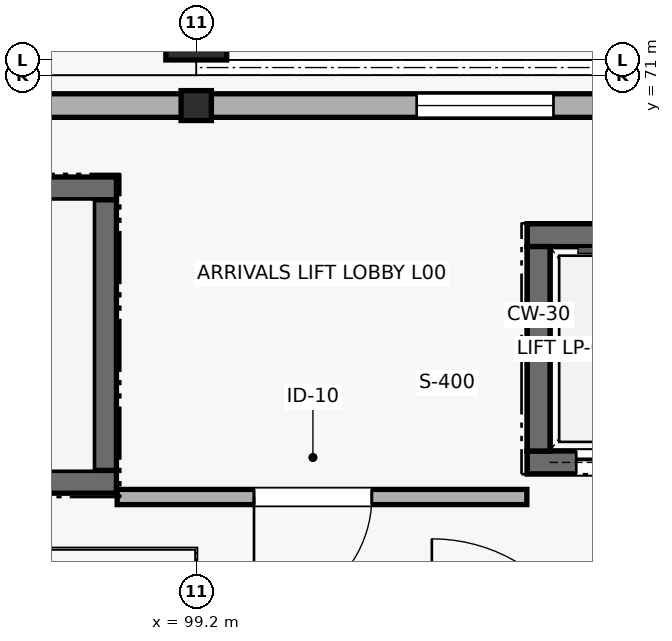
"""IFC4 building model, lengths in metres.
Left out: names, types, materials, properties, quantities, classifications, styles, units other than length and angle.
Written with IfcOpenShell. Run it as: python <this file> out.ifc"""

import sys

from ifc_helpers import new_model, si_unit, direction, frame, frame_2d, origin, origin_2d, place, context, subcontext, project, spatial, rectangle, i_section, extrude, element, fill, save


model = new_model("IFC4")
c1 = context("Model", 3, precision=1e-05, world=origin(), true_north=direction((0.0, 1.0)))
c2 = subcontext(c1, "Body", "Model", "MODEL_VIEW")
j1 = project(units=[si_unit("LENGTHUNIT", "METRE"), si_unit("PLANEANGLEUNIT", "RADIAN")], contexts=[c1])
p1 = place(None, origin())
s1 = spatial("IfcSite", under=j1, at=p1, CompositionType="ELEMENT")
p2 = place(p1, origin())
s2 = spatial("IfcBuilding", under=s1, at=p2, CompositionType="ELEMENT")
p3 = place(p2, origin())
s3 = spatial("IfcBuildingStorey", under=s2, at=p3, CompositionType="ELEMENT", Elevation=0.0)
p4 = place(p3, frame((99.2, 70.6, 0.0), z_axis=(0.0, 0.0, 1.0), x_axis=(1.0, 0.0, 0.0)))
e1 = element("IfcColumn", 1, at=p4, inside=s3, PredefinedType="COLUMN", context=c2, shape_type="SweptSolid", body=[
    extrude(i_section(OverallWidth=0.399, OverallDepth=0.394, WebThickness=0.023, FlangeThickness=0.037, FilletRadius=0.018, at=origin_2d()), origin(), (0.0, 0.0, 1.0), 5.4),
])
p5 = place(p3, frame((99.2, 71.6, 0.0), z_axis=(0.0, 0.0, 1.0), x_axis=(1.0, 0.0, 0.0)))
e2 = element("IfcColumn", 2, at=p5, inside=s3, PredefinedType="COLUMN", context=c2, shape_type="SweptSolid", body=[
    extrude(rectangle(XDim=0.8, YDim=0.8, at=origin_2d()), origin(), (0.0, 0.0, 1.0), 5.4),
])
p6 = place(p3, frame((99.191, 70.6, 0.0), z_axis=(0.0, 0.0, 1.0), x_axis=(-1.0, 0.0, 0.0)))
e3 = element("IfcWall", 3, at=p6, inside=s3, PredefinedType="SOLIDWALL", context=c2, shape_type="SweptSolid", body=[
    extrude(rectangle(XDim=10.581, YDim=0.31, at=frame_2d((5.291, 0.0))), origin(), (0.0, 0.0, 1.0), 4.402),
])
p7 = place(p6, frame((4.291, 0.0, 0.0)))
e4 = element("IfcOpeningElement", 4, at=p7, cuts=e3, PredefinedType="OPENING", context=c2, shape_type="SweptSolid", body=[
    extrude(rectangle(XDim=2.4, YDim=2.6, at=frame_2d((1.2, 1.3))), frame((0.0, 0.165, 0.0), z_axis=(0.0, -1.0, 0.0), x_axis=(1.0, 0.0, 0.0)), (0.0, 0.0, 1.0), 0.33),
])
p8 = place(p3, frame((110.191, 70.6, 0.0), z_axis=(0.0, 0.0, 1.0), x_axis=(-1.0, 0.0, 0.0)))
e5 = element("IfcWall", 5, at=p8, inside=s3, PredefinedType="SOLIDWALL", context=c2, shape_type="SweptSolid", body=[
    extrude(rectangle(XDim=10.981, YDim=0.31, at=frame_2d((5.491, 0.0))), origin(), (0.0, 0.0, 1.0), 4.402),
])
p9 = place(p8, frame((2.591, 0.0, 1.05)))
e6 = element("IfcOpeningElement", 6, at=p9, cuts=e5, PredefinedType="OPENING", context=c2, shape_type="SweptSolid", body=[
    extrude(rectangle(XDim=1.8, YDim=1.8, at=frame_2d((0.9, 0.9))), frame((0.0, 0.165, 0.0), z_axis=(0.0, -1.0, 0.0), x_axis=(1.0, 0.0, 0.0)), (0.0, 0.0, 1.0), 0.33),
])
p10 = place(p8, frame((6.291, 0.0, 1.05)))
e7 = element("IfcOpeningElement", 7, at=p10, cuts=e5, PredefinedType="OPENING", context=c2, shape_type="SweptSolid", body=[
    extrude(rectangle(XDim=1.8, YDim=1.8, at=frame_2d((0.9, 0.9))), frame((0.0, 0.165, 0.0), z_axis=(0.0, -1.0, 0.0), x_axis=(1.0, 0.0, 0.0)), (0.0, 0.0, 1.0), 0.33),
])
p11 = place(p3, frame((89.5, 65.65, 0.0), z_axis=(0.0, 0.0, 1.0), x_axis=(1.0, 0.0, 0.0)))
e8 = element("IfcWall", 8, at=p11, inside=s3, PredefinedType="SHEAR", context=c2, shape_type="SweptSolid", body=[
    extrude(rectangle(XDim=8.65, YDim=0.3, at=frame_2d((4.325, 0.0))), origin(), (0.0, 0.0, 1.0), 5.1),
])
p12 = place(p11, frame((0.55, 0.0, 0.0)))
e9 = element("IfcOpeningElement", 9, at=p12, cuts=e8, PredefinedType="OPENING", context=c2, shape_type="SweptSolid", body=[
    extrude(rectangle(XDim=1.35, YDim=2.2, at=frame_2d((0.675, 1.1))), frame((0.0, 0.16, 0.0), z_axis=(0.0, -1.0, 0.0), x_axis=(1.0, 0.0, 0.0)), (0.0, 0.0, 1.0), 0.32),
])
p13 = place(p3, frame((98.15, 69.51, 0.0), z_axis=(0.0, 0.0, 1.0), x_axis=(-1.0, 0.0, 0.0)))
e10 = element("IfcWall", 10, at=p13, inside=s3, PredefinedType="SHEAR", context=c2, shape_type="SweptSolid", body=[
    extrude(rectangle(XDim=8.65, YDim=0.3, at=frame_2d((4.325, 0.0))), origin(), (0.0, 0.0, 1.0), 5.1),
])
p14 = place(p3, frame((98.0, 65.8, 0.0), z_axis=(0.0, 0.0, 1.0), x_axis=(0.0, 1.0, 0.0)))
e11 = element("IfcWall", 11, at=p14, inside=s3, PredefinedType="SHEAR", context=c2, shape_type="SweptSolid", body=[
    extrude(rectangle(XDim=3.56, YDim=0.3, at=frame_2d((1.78, 0.0))), origin(), (0.0, 0.0, 1.0), 5.1),
])
for number, where, z_axis, x_axis in (
    (12, (103.555, 65.905, -1.4), (0.0, 0.0, 1.0), (1.0, 0.0, 0.0)),
    (13, (106.045, 68.895, -1.4), (0.0, 0.0, 1.0), (-1.0, 0.0, 0.0)),
):
    element("IfcWall", number, at=place(p3, frame(where, z_axis=z_axis, x_axis=x_axis)), inside=s3, PredefinedType="SHEAR", context=c2, shape_type="SweptSolid", body=[
        extrude(rectangle(XDim=2.49, YDim=0.3, at=frame_2d((1.245, 0.0))), origin(), (0.0, 0.0, 1.0), 1.0),
    ])
p15 = place(p3, frame((103.705, 68.745, -1.4), z_axis=(0.0, 0.0, 1.0), x_axis=(0.0, -1.0, 0.0)))
e14 = element("IfcWall", 14, at=p15, inside=s3, PredefinedType="SHEAR", context=c2, shape_type="SweptSolid", body=[
    extrude(rectangle(XDim=2.69, YDim=0.3, at=frame_2d((1.345, 0.0))), origin(), (0.0, 0.0, 1.0), 1.0),
])
p16 = place(p3, frame((103.555, 65.905, 0.0), z_axis=(0.0, 0.0, 1.0), x_axis=(1.0, 0.0, 0.0)))
e15 = element("IfcWall", 15, at=p16, inside=s3, PredefinedType="SHEAR", context=c2, shape_type="SweptSolid", body=[
    extrude(rectangle(XDim=2.49, YDim=0.3, at=frame_2d((1.245, 0.0))), origin(), (0.0, 0.0, 1.0), 5.1),
])
p17 = place(p16, frame((0.645, 0.0, 0.0)))
e16 = element("IfcOpeningElement", 16, at=p17, cuts=e15, PredefinedType="OPENING", context=c2, shape_type="SweptSolid", body=[
    extrude(rectangle(XDim=1.2, YDim=2.15, at=frame_2d((0.6, 1.075))), frame((0.0, 0.16, 0.0), z_axis=(0.0, -1.0, 0.0), x_axis=(1.0, 0.0, 0.0)), (0.0, 0.0, 1.0), 0.32),
])
p18 = place(p3, frame((106.045, 68.895, 0.0), z_axis=(0.0, 0.0, 1.0), x_axis=(-1.0, 0.0, 0.0)))
e17 = element("IfcWall", 17, at=p18, inside=s3, PredefinedType="SHEAR", context=c2, shape_type="SweptSolid", body=[
    extrude(rectangle(XDim=2.49, YDim=0.3, at=frame_2d((1.245, 0.0))), origin(), (0.0, 0.0, 1.0), 5.1),
])
p19 = place(p3, frame((103.705, 68.745, 0.0), z_axis=(0.0, 0.0, 1.0), x_axis=(0.0, -1.0, 0.0)))
e18 = element("IfcWall", 18, at=p19, inside=s3, PredefinedType="SHEAR", context=c2, shape_type="SweptSolid", body=[
    extrude(rectangle(XDim=2.69, YDim=0.3, at=frame_2d((1.345, 0.0))), origin(), (0.0, 0.0, 1.0), 5.1),
])
p20 = place(p3, frame((98.16, 65.45, 0.0), z_axis=(0.0, 0.0, 1.0), x_axis=(1.0, 0.0, 0.0)))
e19 = element("IfcWall", 19, at=p20, inside=s3, PredefinedType="PARTITIONING", context=c2, shape_type="SweptSolid", body=[
    extrude(rectangle(XDim=5.39, YDim=0.2, at=frame_2d((2.695, 0.0))), origin(), (0.0, 0.0, 1.0), 4.483),
])
p21 = place(p20, frame((1.8, 0.0, 0.0)))
e20 = element("IfcOpeningElement", 20, at=p21, cuts=e19, PredefinedType="OPENING", context=c2, shape_type="SweptSolid", body=[
    extrude(rectangle(XDim=1.55, YDim=2.3, at=frame_2d((0.775, 1.15))), frame((0.0, 0.11, 0.0), z_axis=(0.0, -1.0, 0.0), x_axis=(1.0, 0.0, 0.0)), (0.0, 0.0, 1.0), 0.22),
])
p22 = place(p10, origin())
e21 = element("IfcWindow", 21, at=p22, inside=s3, PartitioningType="SINGLE_PANEL", PredefinedType="WINDOW", context=c2, shape_type="SweptSolid", body=[
    extrude(rectangle(XDim=1.8, YDim=1.8, at=frame_2d((0.9, 0.9))), frame((0.0, 0.03, 0.0), z_axis=(0.0, -1.0, 0.0), x_axis=(1.0, 0.0, 0.0)), (0.0, 0.0, 1.0), 0.06),
])
fill(e7, e21)
p23 = place(p17, frame((1.2, 0.0, 0.0), z_axis=(0.0, 0.0, 1.0), x_axis=(-1.0, 0.0, 0.0)))
e22 = element("IfcDoor", 22, at=p23, inside=s3, OperationType="DOUBLE_DOOR_SLIDING", PredefinedType="DOOR", context=c2, shape_type="SweptSolid", body=[
    extrude(rectangle(XDim=1.2, YDim=2.15, at=frame_2d((0.6, 1.075))), frame((0.0, 0.025, 0.0), z_axis=(0.0, -1.0, 0.0), x_axis=(1.0, 0.0, 0.0)), (0.0, 0.0, 1.0), 0.05),
])
fill(e16, e22)
p24 = place(p21, frame((1.55, 0.0, 0.0), z_axis=(0.0, 0.0, 1.0), x_axis=(-1.0, 0.0, 0.0)))
e23 = element("IfcDoor", 23, at=p24, inside=s3, OperationType="SINGLE_SWING_RIGHT", PredefinedType="DOOR", context=c2, shape_type="SweptSolid", body=[
    extrude(rectangle(XDim=1.55, YDim=2.3, at=frame_2d((0.775, 1.15))), frame((0.0, 0.025, 0.0), z_axis=(0.0, -1.0, 0.0), x_axis=(1.0, 0.0, 0.0)), (0.0, 0.0, 1.0), 0.05),
])
fill(e20, e23)
save(model, sys.argv[1])
